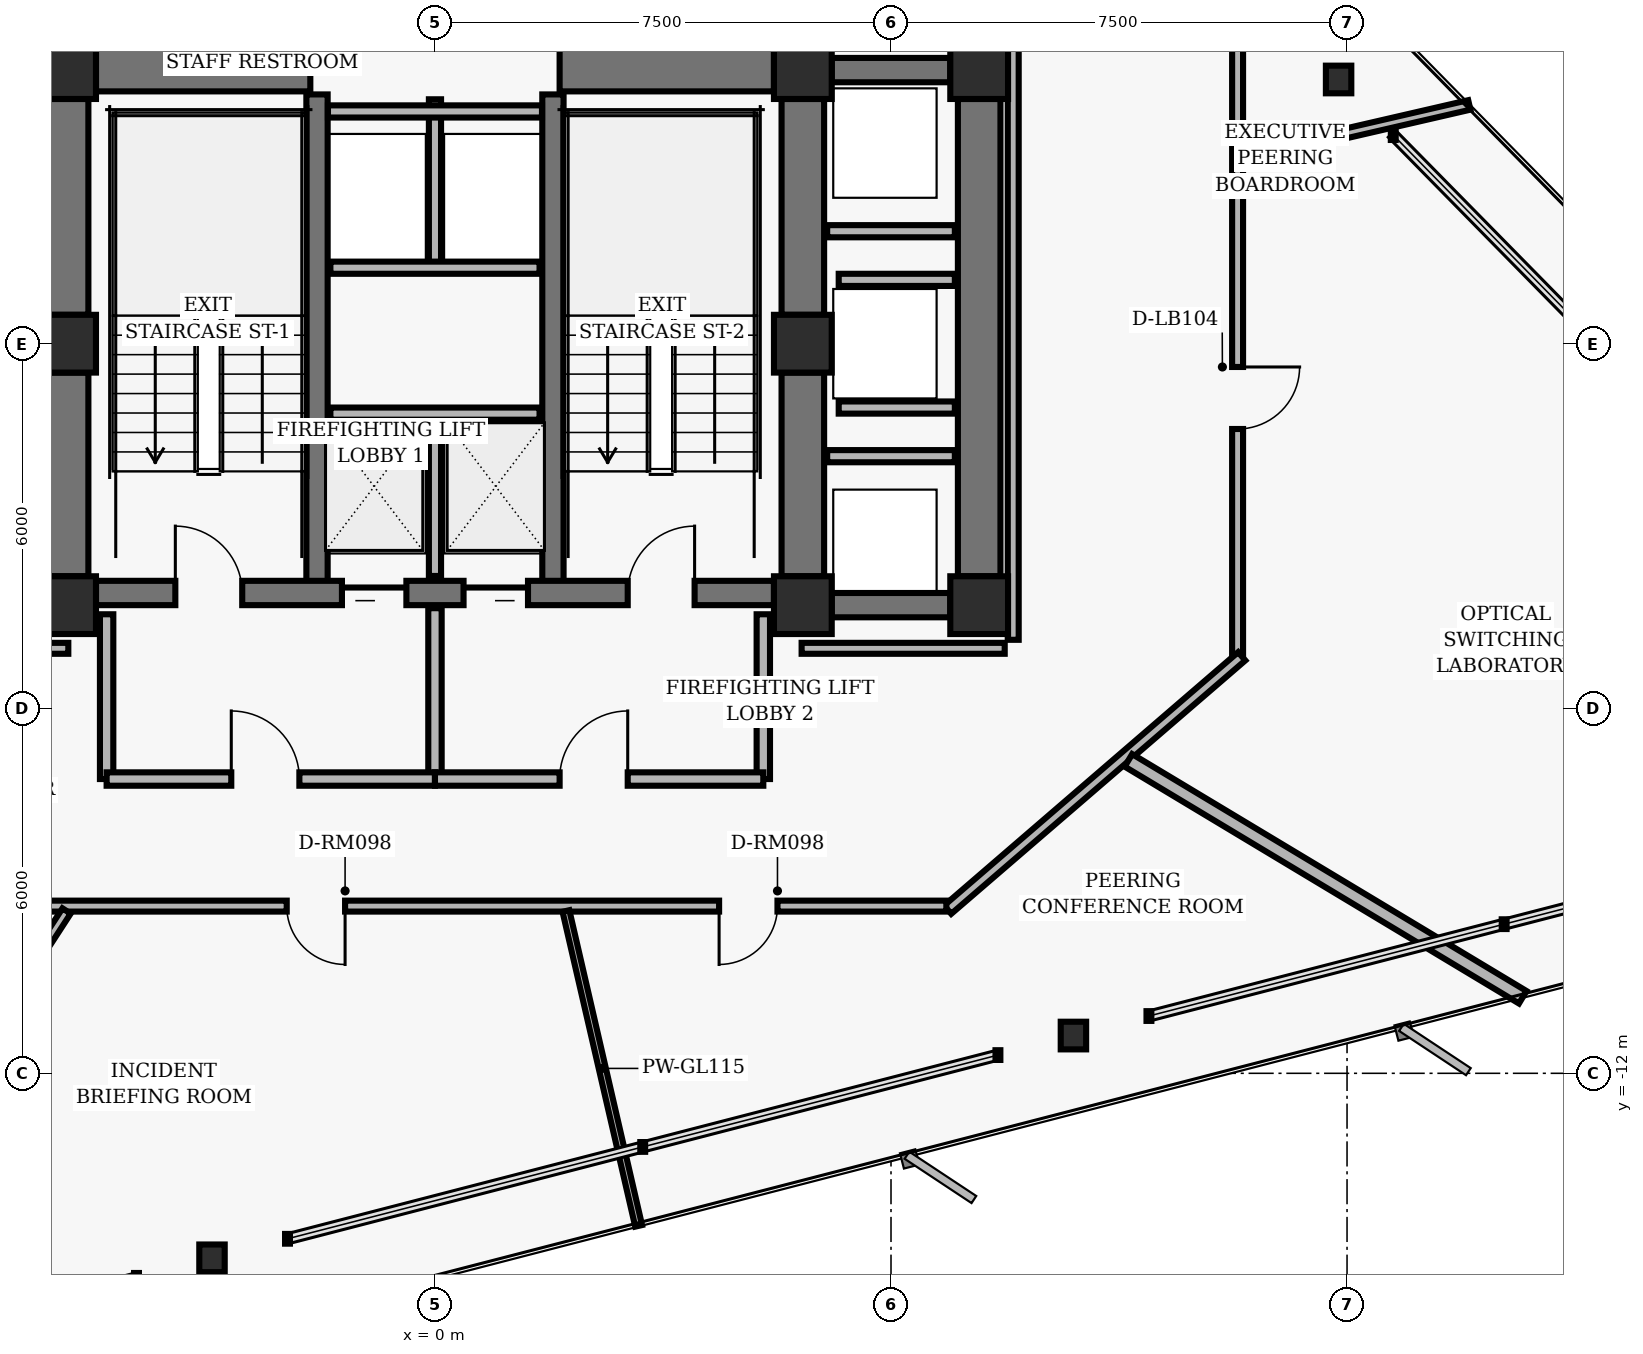
"""IFC4 building model, lengths in metres.
Left out: names, types, materials, properties, quantities, classifications, styles, units other than length and angle.
Written with IfcOpenShell. Run it as: python <this file> out.ifc"""

import sys

from ifc_helpers import new_model, si_unit, direction, frame, frame_2d, origin, origin_2d, place, context, subcontext, project, spatial, rectangle, hollow_rectangle, i_section, extrude, element, fill, save


model = new_model("IFC4")
c1 = context("Model", 3, precision=1e-05, world=origin(), true_north=direction((0.0, 1.0)))
c2 = subcontext(c1, "Body", "Model", "MODEL_VIEW")
j1 = project(units=[si_unit("LENGTHUNIT", "METRE"), si_unit("PLANEANGLEUNIT", "RADIAN")], contexts=[c1])
p1 = place(None, origin())
s1 = spatial("IfcSite", under=j1, at=p1, CompositionType="ELEMENT")
p2 = place(p1, origin())
s2 = spatial("IfcBuilding", under=s1, at=p2, CompositionType="ELEMENT")
p3 = place(p2, frame((0.0, 0.0, 79.52)))
s3 = spatial("IfcBuildingStorey", under=s2, at=p3, CompositionType="ELEMENT", Elevation=79.52)
for number, where, z_axis, x_axis in (
    (1, (-6.05, 4.5, 0.0), (0.0, 0.0, 1.0), (1.0, 0.0, 0.0)),
    (2, (6.05, 4.5, 0.0), (0.0, 0.0, 1.0), (1.0, 0.0, 0.0)),
    (3, (-6.05, 0.0, 0.0), (0.0, 0.0, 1.0), (1.0, 0.0, 0.0)),
    (4, (6.05, 0.0, 0.0), (0.0, 0.0, 1.0), (1.0, 0.0, 0.0)),
    (5, (-6.05, -4.3, 0.0), (0.0, 0.0, 1.0), (1.0, 0.0, 0.0)),
    (6, (6.05, -4.3, 0.0), (0.0, 0.0, 1.0), (1.0, 0.0, 0.0)),
    (7, (8.95, 4.5, 0.0), (0.0, 0.0, 1.0), (1.0, 0.0, 0.0)),
    (8, (8.95, -4.3, 0.0), (0.0, 0.0, 1.0), (1.0, 0.0, 0.0)),
):
    element("IfcColumn", number, at=place(p3, frame(where, z_axis=z_axis, x_axis=x_axis)), inside=s3, PredefinedType="COLUMN", context=c2, shape_type="SweptSolid", body=[
        extrude(hollow_rectangle(XDim=0.95, YDim=0.95, WallThickness=0.06, InnerFilletRadius=0.02, OuterFilletRadius=0.04, at=origin_2d()), origin(), (0.0, 0.0, 1.0), 3.04),
    ])
p4 = place(p3, frame((-6.05, 0.475, 0.0), z_axis=(0.0, 0.0, 1.0), x_axis=(0.0, 1.0, 0.0)))
e9 = element("IfcWall", 9, at=p4, inside=s3, PredefinedType="SHEAR", context=c2, shape_type="SweptSolid", body=[
    extrude(rectangle(XDim=3.55, YDim=0.7, at=frame_2d((1.775, 0.0))), origin(), (0.0, 0.0, 1.0), 2.788),
])
p5 = place(p3, frame((-6.05, -3.825, 0.0), z_axis=(0.0, 0.0, 1.0), x_axis=(0.0, 1.0, 0.0)))
e10 = element("IfcWall", 10, at=p5, inside=s3, PredefinedType="SHEAR", context=c2, shape_type="SweptSolid", body=[
    extrude(rectangle(XDim=3.35, YDim=0.7, at=frame_2d((1.675, 0.0))), origin(), (0.0, 0.0, 1.0), 2.788),
])
p6 = place(p3, frame((6.05, 0.475, 0.0), z_axis=(0.0, 0.0, 1.0), x_axis=(0.0, 1.0, 0.0)))
e11 = element("IfcWall", 11, at=p6, inside=s3, PredefinedType="SHEAR", context=c2, shape_type="SweptSolid", body=[
    extrude(rectangle(XDim=3.55, YDim=0.7, at=frame_2d((1.775, 0.0))), origin(), (0.0, 0.0, 1.0), 2.788),
])
p7 = place(p3, frame((6.05, -3.825, 0.0), z_axis=(0.0, 0.0, 1.0), x_axis=(0.0, 1.0, 0.0)))
e12 = element("IfcWall", 12, at=p7, inside=s3, PredefinedType="SHEAR", context=c2, shape_type="SweptSolid", body=[
    extrude(rectangle(XDim=3.35, YDim=0.7, at=frame_2d((1.675, 0.0))), origin(), (0.0, 0.0, 1.0), 2.788),
])
for number, where, z_axis, x_axis in (
    (13, (-1.94, -4.1, 0.0), (0.0, 0.0, 1.0), (0.0, 1.0, 0.0)),
    (14, (1.94, -4.1, 0.0), (0.0, 0.0, 1.0), (0.0, 1.0, 0.0)),
):
    element("IfcWall", number, at=place(p3, frame(where, z_axis=z_axis, x_axis=x_axis)), inside=s3, PredefinedType="SHEAR", context=c2, shape_type="SweptSolid", body=[
        extrude(rectangle(XDim=8.2, YDim=0.35, at=frame_2d((4.1, 0.0))), origin(), (0.0, 0.0, 1.0), 2.788),
    ])
p8 = place(p3, frame((-5.575, -4.1, 0.0), z_axis=(0.0, 0.0, 1.0), x_axis=(1.0, 0.0, 0.0)))
e15 = element("IfcWall", 15, at=p8, inside=s3, PredefinedType="SHEAR", context=c2, shape_type="SweptSolid", body=[
    extrude(rectangle(XDim=11.15, YDim=0.4, at=frame_2d((5.575, 0.0))), origin(), (0.0, 0.0, 1.0), 2.788),
])
p9 = place(p8, frame((1.305, 0.0, 0.0)))
e16 = element("IfcOpeningElement", 16, at=p9, cuts=e15, PredefinedType="OPENING", context=c2, shape_type="SweptSolid", body=[
    extrude(rectangle(XDim=1.1, YDim=2.04, at=frame_2d((0.55, 1.02))), frame((0.0, 0.21, 0.0), z_axis=(0.0, -1.0, 0.0), x_axis=(1.0, 0.0, 0.0)), (0.0, 0.0, 1.0), 0.42),
])
p10 = place(p8, frame((8.745, 0.0, 0.0)))
e17 = element("IfcOpeningElement", 17, at=p10, cuts=e15, PredefinedType="OPENING", context=c2, shape_type="SweptSolid", body=[
    extrude(rectangle(XDim=1.1, YDim=2.04, at=frame_2d((0.55, 1.02))), frame((0.0, 0.21, 0.0), z_axis=(0.0, -1.0, 0.0), x_axis=(1.0, 0.0, 0.0)), (0.0, 0.0, 1.0), 0.42),
])
p11 = place(p8, frame((4.045, 0.0, 0.0)))
e18 = element("IfcOpeningElement", 18, at=p11, cuts=e15, PredefinedType="OPENING", context=c2, shape_type="SweptSolid", body=[
    extrude(rectangle(XDim=1.06, YDim=2.04, at=frame_2d((0.53, 1.02))), frame((0.0, 0.21, 0.0), z_axis=(0.0, -1.0, 0.0), x_axis=(1.0, 0.0, 0.0)), (0.0, 0.0, 1.0), 0.42),
])
p12 = place(p8, frame((6.045, 0.0, 0.0)))
e19 = element("IfcOpeningElement", 19, at=p12, cuts=e15, PredefinedType="OPENING", context=c2, shape_type="SweptSolid", body=[
    extrude(rectangle(XDim=1.06, YDim=2.04, at=frame_2d((0.53, 1.02))), frame((0.0, 0.21, 0.0), z_axis=(0.0, -1.0, 0.0), x_axis=(1.0, 0.0, 0.0)), (0.0, 0.0, 1.0), 0.42),
])
for number, where, z_axis, x_axis in (
    (20, (-5.575, 4.5, 0.0), (0.0, 0.0, 1.0), (1.0, 0.0, 0.0)),
    (21, (2.05, 4.5, 0.0), (0.0, 0.0, 1.0), (1.0, 0.0, 0.0)),
):
    element("IfcWall", number, at=place(p3, frame(where, z_axis=z_axis, x_axis=x_axis)), inside=s3, PredefinedType="SHEAR", context=c2, shape_type="SweptSolid", body=[
        extrude(rectangle(XDim=3.525, YDim=0.7, at=frame_2d((1.762, 0.0))), origin(), (0.0, 0.0, 1.0), 2.788),
    ])
p13 = place(p3, frame((8.95, -3.825, 0.0), z_axis=(0.0, 0.0, 1.0), x_axis=(0.0, 1.0, 0.0)))
e22 = element("IfcWall", 22, at=p13, inside=s3, PredefinedType="SHEAR", context=c2, shape_type="SweptSolid", body=[
    extrude(rectangle(XDim=7.85, YDim=0.7, at=frame_2d((3.925, 0.0))), origin(), (0.0, 0.0, 1.0), 2.788),
])
for number, where, z_axis, x_axis in (
    (23, (6.525, 4.5, 0.0), (0.0, 0.0, 1.0), (1.0, 0.0, 0.0)),
    (24, (6.525, -4.3, 0.0), (0.0, 0.0, 1.0), (1.0, 0.0, 0.0)),
):
    element("IfcWall", number, at=place(p3, frame(where, z_axis=z_axis, x_axis=x_axis)), inside=s3, PredefinedType="SHEAR", context=c2, shape_type="SweptSolid", body=[
        extrude(rectangle(XDim=1.95, YDim=0.4, at=frame_2d((0.975, 0.0))), origin(), (0.0, 0.0, 1.0), 2.788),
    ])
for number, where, z_axis, x_axis in (
    (25, (14.861, 4.346, 0.0), (0.0, 0.0, 1.0), (1.0, 0.0, 0.0)),
    (26, (-3.667, -15.043, 0.0), (0.0, 0.0, 1.0), (1.0, 0.0, 0.0)),
    (27, (10.5, -11.379, 0.0), (0.0, 0.0, 1.0), (1.0, 0.0, 0.0)),
):
    element("IfcColumn", number, at=place(p3, frame(where, z_axis=z_axis, x_axis=x_axis)), inside=s3, PredefinedType="COLUMN", context=c2, shape_type="SweptSolid", body=[
        extrude(i_section(OverallWidth=0.418, OverallDepth=0.455, WebThickness=0.042, FlangeThickness=0.068, FilletRadius=0.025, at=origin_2d()), origin(), (0.0, 0.0, 1.0), 3.04),
    ])
p14 = place(p3, frame((0.0, -3.82, 0.0), z_axis=(0.0, 0.0, 1.0), x_axis=(0.0, 1.0, 0.0)))
e28 = element("IfcWall", 28, at=p14, inside=s3, PredefinedType="PARTITIONING", context=c2, shape_type="SweptSolid", body=[
    extrude(rectangle(XDim=2.67, YDim=0.2, at=frame_2d((1.335, 0.0))), origin(), (0.0, 0.0, 1.0), 2.763),
])
p15 = place(p3, frame((-1.72, -1.15, 0.0), z_axis=(0.0, 0.0, 1.0), x_axis=(1.0, 0.0, 0.0)))
e29 = element("IfcWall", 29, at=p15, inside=s3, PredefinedType="PARTITIONING", context=c2, shape_type="SweptSolid", body=[
    extrude(rectangle(XDim=3.44, YDim=0.2, at=frame_2d((1.72, 0.0))), origin(), (0.0, 0.0, 1.0), 2.763),
])
for number, where, z_axis, x_axis in (
    (30, (-5.4, -7.16, 0.0), (0.0, 0.0, 1.0), (0.0, 1.0, 0.0)),
    (31, (5.4, -7.16, 0.0), (0.0, 0.0, 1.0), (0.0, 1.0, 0.0)),
):
    element("IfcWall", number, at=place(p3, frame(where, z_axis=z_axis, x_axis=x_axis)), inside=s3, PredefinedType="PARTITIONING", context=c2, shape_type="SweptSolid", body=[
        extrude(rectangle(XDim=2.71, YDim=0.22, at=frame_2d((1.355, 0.0))), origin(), (0.0, 0.0, 1.0), 2.763),
    ])
p16 = place(p3, frame((0.0, -7.16, 0.0), z_axis=(0.0, 0.0, 1.0), x_axis=(0.0, 1.0, 0.0)))
e32 = element("IfcWall", 32, at=p16, inside=s3, PredefinedType="PARTITIONING", context=c2, shape_type="SweptSolid", body=[
    extrude(rectangle(XDim=2.81, YDim=0.22, at=frame_2d((1.405, 0.0))), origin(), (0.0, 0.0, 1.0), 2.763),
])
p17 = place(p3, frame((-5.4, -7.16, 0.0), z_axis=(0.0, 0.0, 1.0), x_axis=(1.0, 0.0, 0.0)))
e33 = element("IfcWall", 33, at=p17, inside=s3, PredefinedType="PARTITIONING", context=c2, shape_type="SweptSolid", body=[
    extrude(rectangle(XDim=5.4, YDim=0.22, at=frame_2d((2.7, 0.0))), origin(), (0.0, 0.0, 1.0), 2.763),
])
p18 = place(p17, frame((2.05, 0.0, 0.0)))
e34 = element("IfcOpeningElement", 34, at=p18, cuts=e33, PredefinedType="OPENING", context=c2, shape_type="SweptSolid", body=[
    extrude(rectangle(XDim=1.12, YDim=2.02, at=frame_2d((0.56, 1.01))), frame((0.0, 0.12, 0.0), z_axis=(0.0, -1.0, 0.0), x_axis=(1.0, 0.0, 0.0)), (0.0, 0.0, 1.0), 0.24),
])
p19 = place(p3, frame((0.0, -7.16, 0.0), z_axis=(0.0, 0.0, 1.0), x_axis=(1.0, 0.0, 0.0)))
e35 = element("IfcWall", 35, at=p19, inside=s3, PredefinedType="PARTITIONING", context=c2, shape_type="SweptSolid", body=[
    extrude(rectangle(XDim=5.4, YDim=0.22, at=frame_2d((2.7, 0.0))), origin(), (0.0, 0.0, 1.0), 2.763),
])
p20 = place(p19, frame((2.05, 0.0, 0.0)))
e36 = element("IfcOpeningElement", 36, at=p20, cuts=e35, PredefinedType="OPENING", context=c2, shape_type="SweptSolid", body=[
    extrude(rectangle(XDim=1.12, YDim=2.02, at=frame_2d((0.56, 1.01))), frame((0.0, 0.12, 0.0), z_axis=(0.0, -1.0, 0.0), x_axis=(1.0, 0.0, 0.0)), (0.0, 0.0, 1.0), 0.24),
])
p21 = place(p3, frame((0.0, 1.25, 0.0), z_axis=(0.0, 0.0, 1.0), x_axis=(0.0, 1.0, 0.0)))
e37 = element("IfcWall", 37, at=p21, inside=s3, PredefinedType="PARTITIONING", context=c2, shape_type="SweptSolid", body=[
    extrude(rectangle(XDim=2.77, YDim=0.2, at=frame_2d((1.385, 0.0))), origin(), (0.0, 0.0, 1.0), 2.763),
])
p22 = place(p3, frame((-1.72, 1.25, 0.0), z_axis=(0.0, 0.0, 1.0), x_axis=(1.0, 0.0, 0.0)))
e38 = element("IfcWall", 38, at=p22, inside=s3, PredefinedType="PARTITIONING", context=c2, shape_type="SweptSolid", body=[
    extrude(rectangle(XDim=3.44, YDim=0.2, at=frame_2d((1.72, 0.0))), origin(), (0.0, 0.0, 1.0), 2.763),
])
p23 = place(p3, frame((-1.76, 3.82, 0.0), z_axis=(0.0, 0.0, 1.0), x_axis=(1.0, 0.0, 0.0)))
e39 = element("IfcWall", 39, at=p23, inside=s3, PredefinedType="PARTITIONING", context=c2, shape_type="SweptSolid", body=[
    extrude(rectangle(XDim=3.52, YDim=0.2, at=frame_2d((1.76, 0.0))), origin(), (0.0, 0.0, 1.0), 2.763),
])
for number, where, z_axis, x_axis in (
    (40, (6.45, -1.85, 0.0), (0.0, 0.0, 1.0), (1.0, 0.0, 0.0)),
    (41, (6.45, 1.85, 0.0), (0.0, 0.0, 1.0), (1.0, 0.0, 0.0)),
):
    element("IfcWall", number, at=place(p3, frame(where, z_axis=z_axis, x_axis=x_axis)), inside=s3, PredefinedType="PARTITIONING", context=c2, shape_type="SweptSolid", body=[
        extrude(rectangle(XDim=2.1, YDim=0.2, at=frame_2d((1.05, 0.0))), origin(), (0.0, 0.0, 1.0), 2.763),
    ])
for number, where, z_axis, x_axis in (
    (42, (6.64, -1.05, 0.0), (0.0, 0.0, 1.0), (1.0, 0.0, 0.0)),
    (43, (6.64, 1.05, 0.0), (0.0, 0.0, 1.0), (1.0, 0.0, 0.0)),
):
    element("IfcWall", number, at=place(p3, frame(where, z_axis=z_axis, x_axis=x_axis)), inside=s3, PredefinedType="PARTITIONING", context=c2, shape_type="SweptSolid", body=[
        extrude(rectangle(XDim=1.91, YDim=0.2, at=frame_2d((0.955, 0.0))), origin(), (0.0, 0.0, 1.0), 2.763),
    ])
p24 = place(p3, frame((13.2, 5.11, 0.0), z_axis=(0.0, 0.0, 1.0), x_axis=(0.0, -1.0, 0.0)))
e44 = element("IfcWall", 44, at=p24, inside=s3, PredefinedType="PARTITIONING", context=c2, shape_type="SweptSolid", body=[
    extrude(rectangle(XDim=10.22, YDim=0.18, at=frame_2d((5.11, 0.0))), origin(), (0.0, 0.0, 1.0), 2.277),
])
p25 = place(p24, frame((5.493, 0.0, 0.0)))
e45 = element("IfcOpeningElement", 45, at=p25, cuts=e44, PredefinedType="OPENING", context=c2, shape_type="SweptSolid", body=[
    extrude(rectangle(XDim=1.02, YDim=2.02, at=frame_2d((0.51, 1.01))), frame((0.0, 0.1, 0.0), z_axis=(0.0, -1.0, 0.0), x_axis=(1.0, 0.0, 0.0)), (0.0, 0.0, 1.0), 0.2),
])
p26 = place(p3, frame((13.268, -5.141, 0.0), z_axis=(0.0, 0.0, 1.0), x_axis=(-0.757534501725, -0.65279512766, 0.0)))
e46 = element("IfcWall", 46, at=p26, inside=s3, PredefinedType="PARTITIONING", context=c2, shape_type="SweptSolid", body=[
    extrude(rectangle(XDim=6.385, YDim=0.18, at=frame_2d((3.192, 0.0))), origin(), (0.0, 0.0, 1.0), 2.763),
])
p27 = place(p3, frame((8.41, -9.25, 0.0), z_axis=(0.0, 0.0, 1.0), x_axis=(-1.0, 0.0, 0.0)))
e47 = element("IfcWall", 47, at=p27, inside=s3, PredefinedType="PARTITIONING", context=c2, shape_type="SweptSolid", body=[
    extrude(rectangle(XDim=17.0, YDim=0.18, at=frame_2d((8.5, 0.0))), origin(), (0.0, 0.0, 1.0), 2.277),
])
p28 = place(p27, frame((9.888, 0.0, 0.0)))
e48 = element("IfcOpeningElement", 48, at=p28, cuts=e47, PredefinedType="OPENING", context=c2, shape_type="SweptSolid", body=[
    extrude(rectangle(XDim=0.96, YDim=2.02, at=frame_2d((0.48, 1.01))), frame((0.0, 0.1, 0.0), z_axis=(0.0, -1.0, 0.0), x_axis=(1.0, 0.0, 0.0)), (0.0, 0.0, 1.0), 0.2),
])
p29 = place(p27, frame((2.777, 0.0, 0.0)))
e49 = element("IfcOpeningElement", 49, at=p29, cuts=e47, PredefinedType="OPENING", context=c2, shape_type="SweptSolid", body=[
    extrude(rectangle(XDim=0.96, YDim=2.02, at=frame_2d((0.48, 1.01))), frame((0.0, 0.1, 0.0), z_axis=(0.0, -1.0, 0.0), x_axis=(1.0, 0.0, 0.0)), (0.0, 0.0, 1.0), 0.2),
])
for number, where, z_axis, x_axis in (
    (50, (-9.37, -5.01, 0.0), (0.0, 0.0, 1.0), (1.0, 0.0, 0.0)),
    (51, (6.03, -5.01, 0.0), (0.0, 0.0, 1.0), (1.0, 0.0, 0.0)),
):
    element("IfcWall", number, at=place(p3, frame(where, z_axis=z_axis, x_axis=x_axis)), inside=s3, PredefinedType="PARTITIONING", context=c2, shape_type="SweptSolid", body=[
        extrude(rectangle(XDim=3.34, YDim=0.18, at=frame_2d((1.67, 0.0))), origin(), (0.0, 0.0, 1.0), 2.763),
    ])
p30 = place(p3, frame((9.51, -4.87, 0.0), z_axis=(0.0, 0.0, 1.0), x_axis=(0.0, 1.0, 0.0)))
e52 = element("IfcWall", 52, at=p30, inside=s3, PredefinedType="PARTITIONING", context=c2, shape_type="SweptSolid", body=[
    extrude(rectangle(XDim=9.74, YDim=0.18, at=frame_2d((4.87, 0.0))), origin(), (0.0, 0.0, 1.0), 2.048),
])
p31 = place(p3, frame((-6.059, -9.33, 0.0), z_axis=(0.0, 0.0, 1.0), x_axis=(-0.544635087887, -0.838673131227, 0.0)))
e53 = element("IfcWall", 53, at=p31, inside=s3, PredefinedType="PARTITIONING", context=c2, shape_type="SweptSolid", body=[
    extrude(rectangle(XDim=10.908, YDim=0.16, at=frame_2d((5.454, 0.0))), origin(), (0.0, 0.0, 1.0), 2.763),
])
p32 = place(p3, frame((2.154, -9.33, 0.0), z_axis=(0.0, 0.0, 1.0), x_axis=(0.22493330832, -0.974374161607, 0.0)))
e54 = element("IfcWall", 54, at=p32, inside=s3, PredefinedType="MOVABLE", context=c2, shape_type="SweptSolid", body=[
    extrude(rectangle(XDim=5.315, YDim=0.115, at=frame_2d((2.658, 0.0))), origin(), (0.0, 0.0, 1.0), 2.763),
])
p33 = place(p3, frame((11.405, -6.853, 0.0), z_axis=(0.0, 0.0, 1.0), x_axis=(0.857165278127, -0.515041441025, 0.0)))
e55 = element("IfcWall", 55, at=p33, inside=s3, PredefinedType="PARTITIONING", context=c2, shape_type="SweptSolid", body=[
    extrude(rectangle(XDim=7.565, YDim=0.24, at=frame_2d((3.782, 0.0))), origin(), (0.0, 0.0, 1.0), 2.763),
])
p34 = place(p3, frame((13.28, 3.066, 0.0), z_axis=(0.0, 0.0, 1.0), x_axis=(0.974371849336, 0.224943324464, 0.0)))
e56 = element("IfcWall", 56, at=p34, inside=s3, PredefinedType="PARTITIONING", context=c2, shape_type="SweptSolid", body=[
    extrude(rectangle(XDim=3.829, YDim=0.16, at=frame_2d((1.915, 0.0))), origin(), (0.0, 0.0, 1.0), 2.763),
])
p35 = place(p9, origin())
e57 = element("IfcDoor", 57, at=p35, inside=s3, OperationType="SINGLE_SWING_LEFT", PredefinedType="DOOR", context=c2, shape_type="SweptSolid", body=[
    extrude(rectangle(XDim=1.1, YDim=2.04, at=frame_2d((0.55, 1.02))), frame((0.0, 0.025, 0.0), z_axis=(0.0, -1.0, 0.0), x_axis=(1.0, 0.0, 0.0)), (0.0, 0.0, 1.0), 0.05),
])
fill(e16, e57)
p36 = place(p10, origin())
e58 = element("IfcDoor", 58, at=p36, inside=s3, OperationType="SINGLE_SWING_RIGHT", PredefinedType="DOOR", context=c2, shape_type="SweptSolid", body=[
    extrude(rectangle(XDim=1.1, YDim=2.04, at=frame_2d((0.55, 1.02))), frame((0.0, 0.025, 0.0), z_axis=(0.0, -1.0, 0.0), x_axis=(1.0, 0.0, 0.0)), (0.0, 0.0, 1.0), 0.05),
])
fill(e17, e58)
p37 = place(p11, origin())
e59 = element("IfcDoor", 59, at=p37, inside=s3, OperationType="SLIDING_TO_LEFT", PredefinedType="DOOR", context=c2, shape_type="SweptSolid", body=[
    extrude(rectangle(XDim=1.06, YDim=2.04, at=frame_2d((0.53, 1.02))), frame((0.0, 0.025, 0.0), z_axis=(0.0, -1.0, 0.0), x_axis=(1.0, 0.0, 0.0)), (0.0, 0.0, 1.0), 0.05),
])
fill(e18, e59)
p38 = place(p12, origin())
e60 = element("IfcDoor", 60, at=p38, inside=s3, OperationType="SLIDING_TO_RIGHT", PredefinedType="DOOR", context=c2, shape_type="SweptSolid", body=[
    extrude(rectangle(XDim=1.06, YDim=2.04, at=frame_2d((0.53, 1.02))), frame((0.0, 0.025, 0.0), z_axis=(0.0, -1.0, 0.0), x_axis=(1.0, 0.0, 0.0)), (0.0, 0.0, 1.0), 0.05),
])
fill(e19, e60)
p39 = place(p18, origin())
e61 = element("IfcDoor", 61, at=p39, inside=s3, OperationType="SINGLE_SWING_LEFT", PredefinedType="DOOR", context=c2, shape_type="SweptSolid", body=[
    extrude(rectangle(XDim=1.12, YDim=2.02, at=frame_2d((0.56, 1.01))), frame((0.0, 0.025, 0.0), z_axis=(0.0, -1.0, 0.0), x_axis=(1.0, 0.0, 0.0)), (0.0, 0.0, 1.0), 0.05),
])
fill(e34, e61)
p40 = place(p20, origin())
e62 = element("IfcDoor", 62, at=p40, inside=s3, OperationType="SINGLE_SWING_RIGHT", PredefinedType="DOOR", context=c2, shape_type="SweptSolid", body=[
    extrude(rectangle(XDim=1.12, YDim=2.02, at=frame_2d((0.56, 1.01))), frame((0.0, 0.025, 0.0), z_axis=(0.0, -1.0, 0.0), x_axis=(1.0, 0.0, 0.0)), (0.0, 0.0, 1.0), 0.05),
])
fill(e36, e62)
p41 = place(p28, origin())
e63 = element("IfcDoor", 63, at=p41, inside=s3, OperationType="SINGLE_SWING_LEFT", PredefinedType="DOOR", context=c2, shape_type="SweptSolid", body=[
    extrude(rectangle(XDim=0.96, YDim=2.02, at=frame_2d((0.48, 1.01))), frame((0.0, 0.025, 0.0), z_axis=(0.0, -1.0, 0.0), x_axis=(1.0, 0.0, 0.0)), (0.0, 0.0, 1.0), 0.05),
])
fill(e48, e63)
p42 = place(p29, origin())
e64 = element("IfcDoor", 64, at=p42, inside=s3, OperationType="SINGLE_SWING_RIGHT", PredefinedType="DOOR", context=c2, shape_type="SweptSolid", body=[
    extrude(rectangle(XDim=0.96, YDim=2.02, at=frame_2d((0.48, 1.01))), frame((0.0, 0.025, 0.0), z_axis=(0.0, -1.0, 0.0), x_axis=(1.0, 0.0, 0.0)), (0.0, 0.0, 1.0), 0.05),
])
fill(e49, e64)
p43 = place(p25, origin())
e65 = element("IfcDoor", 65, at=p43, inside=s3, OperationType="SINGLE_SWING_LEFT", PredefinedType="DOOR", context=c2, shape_type="SweptSolid", body=[
    extrude(rectangle(XDim=1.02, YDim=2.02, at=frame_2d((0.51, 1.01))), frame((0.0, 0.025, 0.0), z_axis=(0.0, -1.0, 0.0), x_axis=(1.0, 0.0, 0.0)), (0.0, 0.0, 1.0), 0.05),
])
fill(e45, e65)
save(model, sys.argv[1])
